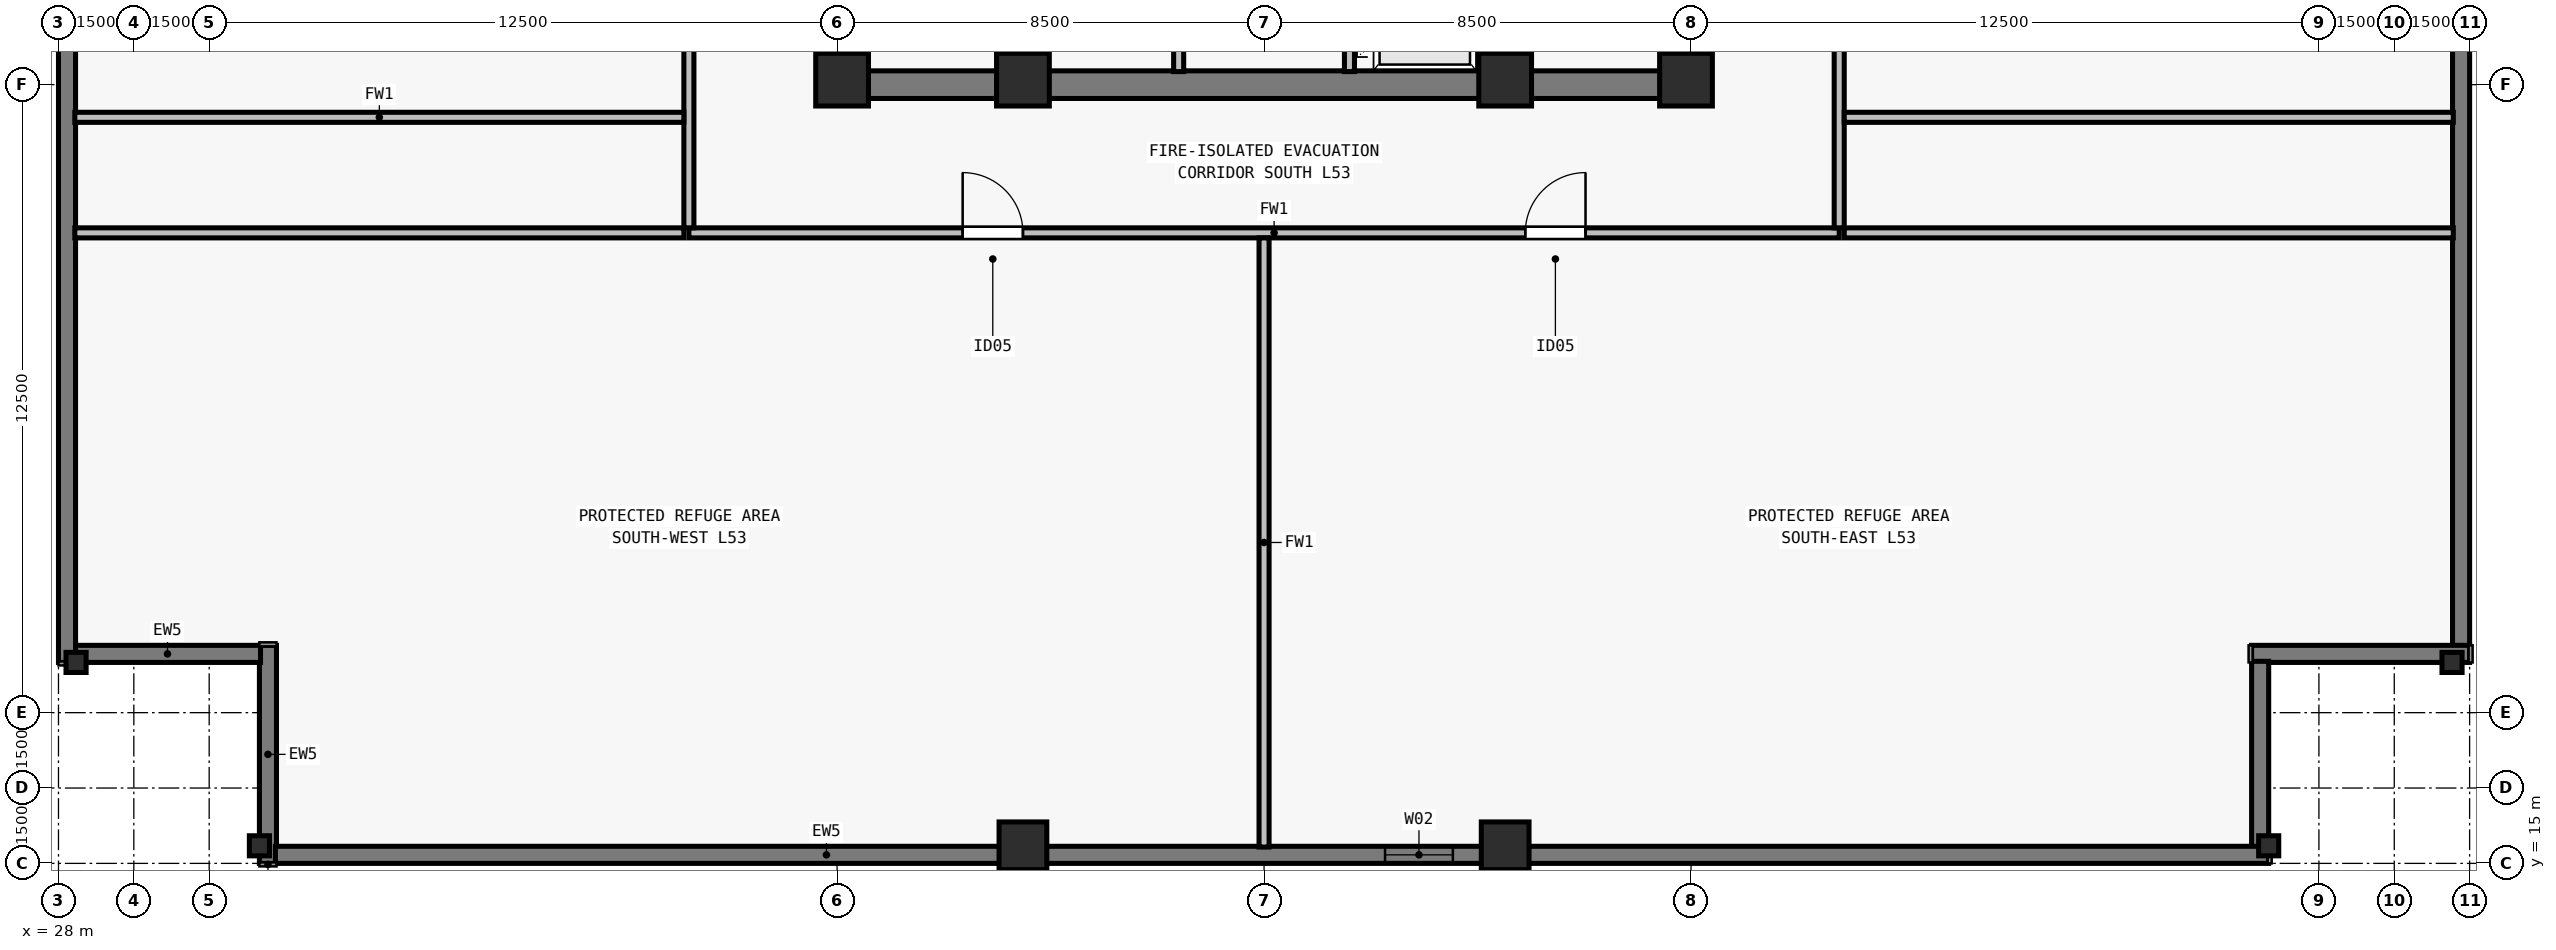
"""IFC4 building model, lengths in metres.
Left out: names, types, materials, properties, quantities, classifications, styles, units other than length and angle.
Written with IfcOpenShell. Run it as: python <this file> out.ifc"""

import sys

from ifc_helpers import new_model, si_unit, direction, frame, frame_2d, origin, origin_2d, place, context, subcontext, project, spatial, rectangle, i_section, extrude, element, fill, save


model = new_model("IFC4")
c1 = context("Model", 3, precision=1e-05, world=origin(), true_north=direction((0.0, 1.0)))
c2 = subcontext(c1, "Body", "Model", "MODEL_VIEW")
j1 = project(units=[si_unit("LENGTHUNIT", "METRE"), si_unit("PLANEANGLEUNIT", "RADIAN")], contexts=[c1])
p1 = place(None, origin())
s1 = spatial("IfcSite", under=j1, at=p1, CompositionType="ELEMENT")
p2 = place(p1, origin())
s2 = spatial("IfcBuilding", under=s1, at=p2, CompositionType="ELEMENT")
p3 = place(p2, frame((0.0, 0.0, 193.5)))
s3 = spatial("IfcBuildingStorey", under=s2, at=p3, CompositionType="ELEMENT", Elevation=193.5)
for number, where, z_axis, x_axis in (
    (1, (43.6, 30.6, 0.0), (0.0, 0.0, 1.0), (1.0, 0.0, 0.0)),
    (2, (47.2, 30.6, 0.0), (0.0, 0.0, 1.0), (1.0, 0.0, 0.0)),
    (3, (56.8, 30.6, 0.0), (0.0, 0.0, 1.0), (1.0, 0.0, 0.0)),
    (4, (60.4, 30.6, 0.0), (0.0, 0.0, 1.0), (1.0, 0.0, 0.0)),
):
    element("IfcColumn", number, at=place(p3, frame(where, z_axis=z_axis, x_axis=x_axis)), inside=s3, PredefinedType="COLUMN", context=c2, shape_type="SweptSolid", body=[
        extrude(rectangle(XDim=1.05, YDim=1.05, at=origin_2d()), origin(), (0.0, 0.0, 1.0), 4.5),
    ])
p4 = place(p3, frame((32.0, 15.35, 0.0), z_axis=(0.0, 0.0, 1.0), x_axis=(1.0, 0.0, 0.0)))
e5 = element("IfcColumn", 5, at=p4, inside=s3, PredefinedType="COLUMN", context=c2, shape_type="SweptSolid", body=[
    extrude(i_section(OverallWidth=0.4, OverallDepth=0.4, WebThickness=0.022, FlangeThickness=0.036, at=origin_2d()), origin(), (0.0, 0.0, 1.0), 4.5),
])
for number, where, z_axis, x_axis in (
    (6, (47.2, 15.35, 0.0), (0.0, 0.0, 1.0), (1.0, 0.0, 0.0)),
    (7, (56.8, 15.35, 0.0), (0.0, 0.0, 1.0), (1.0, 0.0, 0.0)),
):
    element("IfcColumn", number, at=place(p3, frame(where, z_axis=z_axis, x_axis=x_axis)), inside=s3, PredefinedType="COLUMN", context=c2, shape_type="SweptSolid", body=[
        extrude(rectangle(XDim=0.95, YDim=0.95, at=origin_2d()), origin(), (0.0, 0.0, 1.0), 4.5),
    ])
for number, where, z_axis, x_axis in (
    (8, (72.0, 15.35, 0.0), (0.0, 0.0, 1.0), (1.0, 0.0, 0.0)),
    (9, (75.65, 19.0, 0.0), (0.0, 0.0, 1.0), (0.0, 1.0, 0.0)),
    (10, (28.35, 19.0, 0.0), (0.0, 0.0, 1.0), (0.0, 1.0, 0.0)),
):
    element("IfcColumn", number, at=place(p3, frame(where, z_axis=z_axis, x_axis=x_axis)), inside=s3, PredefinedType="COLUMN", context=c2, shape_type="SweptSolid", body=[
        extrude(i_section(OverallWidth=0.4, OverallDepth=0.4, WebThickness=0.022, FlangeThickness=0.036, at=origin_2d()), origin(), (0.0, 0.0, 1.0), 4.5),
    ])
p5 = place(p3, frame((32.17, 15.0, 0.0), z_axis=(0.0, 0.0, 1.0), x_axis=(0.0, 1.0, 0.0)))
e11 = element("IfcWall", 11, at=p5, inside=s3, PredefinedType="SOLIDWALL", context=c2, shape_type="SweptSolid", body=[
    extrude(rectangle(XDim=4.34, YDim=0.34, at=frame_2d((2.17, 0.0))), origin(), (0.0, 0.0, 1.0), 4.29),
])
p6 = place(p3, frame((32.022, 19.17, 0.0), z_axis=(0.0, 0.0, 1.0), x_axis=(-1.0, 0.0, 0.0)))
e12 = element("IfcWall", 12, at=p6, inside=s3, PredefinedType="SOLIDWALL", context=c2, shape_type="SweptSolid", body=[
    extrude(rectangle(XDim=3.704, YDim=0.34, at=frame_2d((1.852, 0.0))), origin(), (0.0, 0.0, 1.0), 4.29),
])
for number, where, z_axis, x_axis in (
    (13, (28.17, 19.0, 0.0), (0.0, 0.0, 1.0), (0.0, 1.0, 0.0)),
    (14, (75.83, 59.0, 0.0), (0.0, 0.0, 1.0), (0.0, -1.0, 0.0)),
):
    element("IfcWall", number, at=place(p3, frame(where, z_axis=z_axis, x_axis=x_axis)), inside=s3, PredefinedType="SOLIDWALL", context=c2, shape_type="SweptSolid", body=[
        extrude(rectangle(XDim=39.682, YDim=0.34, at=frame_2d((19.841, 0.0))), origin(), (0.0, 0.0, 1.0), 4.29),
    ])
p7 = place(p3, frame((76.0, 19.17, 0.0), z_axis=(0.0, 0.0, 1.0), x_axis=(-1.0, 0.0, 0.0)))
e15 = element("IfcWall", 15, at=p7, inside=s3, PredefinedType="SOLIDWALL", context=c2, shape_type="SweptSolid", body=[
    extrude(rectangle(XDim=4.34, YDim=0.34, at=frame_2d((2.17, 0.0))), origin(), (0.0, 0.0, 1.0), 4.29),
])
p8 = place(p3, frame((71.83, 19.022, 0.0), z_axis=(0.0, 0.0, 1.0), x_axis=(0.0, -1.0, 0.0)))
e16 = element("IfcWall", 16, at=p8, inside=s3, PredefinedType="SOLIDWALL", context=c2, shape_type="SweptSolid", body=[
    extrude(rectangle(XDim=3.704, YDim=0.34, at=frame_2d((1.852, 0.0))), origin(), (0.0, 0.0, 1.0), 4.29),
])
p9 = place(p3, frame((72.0, 15.17, 0.0), z_axis=(0.0, 0.0, 1.0), x_axis=(-1.0, 0.0, 0.0)))
e17 = element("IfcWall", 17, at=p9, inside=s3, PredefinedType="SOLIDWALL", context=c2, shape_type="SweptSolid", body=[
    extrude(rectangle(XDim=39.682, YDim=0.34, at=frame_2d((19.841, 0.0))), origin(), (0.0, 0.0, 1.0), 4.29),
])
p10 = place(p9, frame((16.241, 0.0, 0.8)))
e18 = element("IfcOpeningElement", 18, at=p10, cuts=e17, PredefinedType="OPENING", context=c2, shape_type="SweptSolid", body=[
    extrude(rectangle(XDim=1.35, YDim=1.54, at=frame_2d((0.675, 0.77))), frame((0.0, 0.18, 0.0), z_axis=(0.0, -1.0, 0.0), x_axis=(1.0, 0.0, 0.0)), (0.0, 0.0, 1.0), 0.36),
])
p11 = place(p3, frame((43.225, 30.5, 0.0), z_axis=(0.0, 0.0, 1.0), x_axis=(1.0, 0.0, 0.0)))
e19 = element("IfcWall", 19, at=p11, inside=s3, PredefinedType="SHEAR", context=c2, shape_type="SweptSolid", body=[
    extrude(rectangle(XDim=17.55, YDim=0.55, at=frame_2d((8.775, 0.0))), origin(), (0.0, 0.0, 1.0), 4.29),
])
for number, where, z_axis, x_axis in (
    (20, (43.5, 30.765, 0.0), (0.0, 0.0, 1.0), (0.0, 1.0, 0.0)),
    (21, (60.5, 30.765, 0.0), (0.0, 0.0, 1.0), (0.0, 1.0, 0.0)),
):
    element("IfcWall", number, at=place(p3, frame(where, z_axis=z_axis, x_axis=x_axis)), inside=s3, PredefinedType="SHEAR", context=c2, shape_type="SweptSolid", body=[
        extrude(rectangle(XDim=7.985, YDim=0.55, at=frame_2d((3.993, 0.0))), origin(), (0.0, 0.0, 1.0), 4.29),
    ])
p12 = place(p3, frame((50.3, 30.76, 0.0), z_axis=(0.0, 0.0, 1.0), x_axis=(0.0, 1.0, 0.0)))
e22 = element("IfcWall", 22, at=p12, inside=s3, PredefinedType="SOLIDWALL", context=c2, shape_type="SweptSolid", body=[
    extrude(rectangle(XDim=7.855, YDim=0.2, at=frame_2d((3.927, 0.0))), origin(), (0.0, 0.0, 1.0), 4.29),
])
p13 = place(p12, frame((1.34, 0.0, 0.0)))
e23 = element("IfcOpeningElement", 23, at=p13, cuts=e22, PredefinedType="OPENING", context=c2, shape_type="SweptSolid", body=[
    extrude(rectangle(XDim=0.9, YDim=2.12, at=frame_2d((0.45, 1.06))), frame((0.0, 0.11, 0.0), z_axis=(0.0, -1.0, 0.0), x_axis=(1.0, 0.0, 0.0)), (0.0, 0.0, 1.0), 0.22),
])
p14 = place(p12, frame((5.34, 0.0, 0.0)))
e24 = element("IfcOpeningElement", 24, at=p14, cuts=e22, PredefinedType="OPENING", context=c2, shape_type="SweptSolid", body=[
    extrude(rectangle(XDim=0.9, YDim=2.12, at=frame_2d((0.45, 1.06))), frame((0.0, 0.11, 0.0), z_axis=(0.0, -1.0, 0.0), x_axis=(1.0, 0.0, 0.0)), (0.0, 0.0, 1.0), 0.22),
])
p15 = place(p3, frame((53.7, 30.76, 0.0), z_axis=(0.0, 0.0, 1.0), x_axis=(0.0, 1.0, 0.0)))
e25 = element("IfcWall", 25, at=p15, inside=s3, PredefinedType="SOLIDWALL", context=c2, shape_type="SweptSolid", body=[
    extrude(rectangle(XDim=7.855, YDim=0.2, at=frame_2d((3.927, 0.0))), origin(), (0.0, 0.0, 1.0), 4.29),
])
p16 = place(p15, frame((0.79, 0.0, 0.0)))
e26 = element("IfcOpeningElement", 26, at=p16, cuts=e25, PredefinedType="OPENING", context=c2, shape_type="SweptSolid", body=[
    extrude(rectangle(XDim=1.1, YDim=2.2, at=frame_2d((0.55, 1.1))), frame((0.0, 0.11, 0.0), z_axis=(0.0, -1.0, 0.0), x_axis=(1.0, 0.0, 0.0)), (0.0, 0.0, 1.0), 0.22),
])
p17 = place(p15, frame((3.49, 0.0, 0.0)))
e27 = element("IfcOpeningElement", 27, at=p17, cuts=e25, PredefinedType="OPENING", context=c2, shape_type="SweptSolid", body=[
    extrude(rectangle(XDim=1.1, YDim=2.2, at=frame_2d((0.55, 1.1))), frame((0.0, 0.11, 0.0), z_axis=(0.0, -1.0, 0.0), x_axis=(1.0, 0.0, 0.0)), (0.0, 0.0, 1.0), 0.22),
])
p18 = place(p15, frame((6.19, 0.0, 0.0)))
e28 = element("IfcOpeningElement", 28, at=p18, cuts=e25, PredefinedType="OPENING", context=c2, shape_type="SweptSolid", body=[
    extrude(rectangle(XDim=1.1, YDim=2.2, at=frame_2d((0.55, 1.1))), frame((0.0, 0.11, 0.0), z_axis=(0.0, -1.0, 0.0), x_axis=(1.0, 0.0, 0.0)), (0.0, 0.0, 1.0), 0.22),
])
p19 = place(p3, frame((47.35, 30.76, 0.0), z_axis=(0.0, 0.0, 1.0), x_axis=(0.0, 1.0, 0.0)))
e29 = element("IfcWall", 29, at=p19, inside=s3, PredefinedType="PARTITIONING", context=c2, shape_type="SweptSolid", body=[
    extrude(rectangle(XDim=7.855, YDim=0.16, at=frame_2d((3.927, 0.0))), origin(), (0.0, 0.0, 1.0), 4.29),
])
p20 = place(p3, frame((56.65, 30.76, 0.0), z_axis=(0.0, 0.0, 1.0), x_axis=(0.0, 1.0, 0.0)))
e30 = element("IfcWall", 30, at=p20, inside=s3, PredefinedType="SOLIDWALL", context=c2, shape_type="SweptSolid", body=[
    extrude(rectangle(XDim=7.855, YDim=0.18, at=frame_2d((3.927, 0.0))), origin(), (0.0, 0.0, 1.0), 4.29),
])
p21 = place(p3, frame((40.55, 27.55, 0.0), z_axis=(0.0, 0.0, 1.0), x_axis=(1.0, 0.0, 0.0)))
e31 = element("IfcWall", 31, at=p21, inside=s3, PredefinedType="SOLIDWALL", context=c2, shape_type="SweptSolid", body=[
    extrude(rectangle(XDim=22.9, YDim=0.2, at=frame_2d((11.45, 0.0))), origin(), (0.0, 0.0, 1.0), 4.29),
])
p22 = place(p21, frame((5.45, 0.0, 0.0)))
e32 = element("IfcOpeningElement", 32, at=p22, cuts=e31, PredefinedType="OPENING", context=c2, shape_type="SweptSolid", body=[
    extrude(rectangle(XDim=1.2, YDim=2.15, at=frame_2d((0.6, 1.075))), frame((0.0, 0.11, 0.0), z_axis=(0.0, -1.0, 0.0), x_axis=(1.0, 0.0, 0.0)), (0.0, 0.0, 1.0), 0.22),
])
p23 = place(p21, frame((16.65, 0.0, 0.0)))
e33 = element("IfcOpeningElement", 33, at=p23, cuts=e31, PredefinedType="OPENING", context=c2, shape_type="SweptSolid", body=[
    extrude(rectangle(XDim=1.2, YDim=2.15, at=frame_2d((0.6, 1.075))), frame((0.0, 0.11, 0.0), z_axis=(0.0, -1.0, 0.0), x_axis=(1.0, 0.0, 0.0)), (0.0, 0.0, 1.0), 0.22),
])
p24 = place(p3, frame((40.55, 27.65, 0.0), z_axis=(0.0, 0.0, 1.0), x_axis=(0.0, 1.0, 0.0)))
e34 = element("IfcWall", 34, at=p24, inside=s3, PredefinedType="SOLIDWALL", context=c2, shape_type="SweptSolid", body=[
    extrude(rectangle(XDim=22.7, YDim=0.2, at=frame_2d((11.35, 0.0))), origin(), (0.0, 0.0, 1.0), 4.29),
])
p25 = place(p24, frame((9.2, 0.0, 0.0)))
e35 = element("IfcOpeningElement", 35, at=p25, cuts=e34, PredefinedType="OPENING", context=c2, shape_type="SweptSolid", body=[
    extrude(rectangle(XDim=1.6, YDim=2.2, at=frame_2d((0.8, 1.1))), frame((0.0, 0.11, 0.0), z_axis=(0.0, -1.0, 0.0), x_axis=(1.0, 0.0, 0.0)), (0.0, 0.0, 1.0), 0.22),
])
p26 = place(p3, frame((63.45, 27.65, 0.0), z_axis=(0.0, 0.0, 1.0), x_axis=(0.0, 1.0, 0.0)))
e36 = element("IfcWall", 36, at=p26, inside=s3, PredefinedType="SOLIDWALL", context=c2, shape_type="SweptSolid", body=[
    extrude(rectangle(XDim=22.7, YDim=0.2, at=frame_2d((11.35, 0.0))), origin(), (0.0, 0.0, 1.0), 4.29),
])
p27 = place(p26, frame((9.2, 0.0, 0.0)))
e37 = element("IfcOpeningElement", 37, at=p27, cuts=e36, PredefinedType="OPENING", context=c2, shape_type="SweptSolid", body=[
    extrude(rectangle(XDim=1.6, YDim=2.2, at=frame_2d((0.8, 1.1))), frame((0.0, 0.11, 0.0), z_axis=(0.0, -1.0, 0.0), x_axis=(1.0, 0.0, 0.0)), (0.0, 0.0, 1.0), 0.22),
])
for number, where, z_axis, x_axis in (
    (38, (28.325, 29.85, 0.0), (0.0, 0.0, 1.0), (1.0, 0.0, 0.0)),
    (39, (63.55, 29.85, 0.0), (0.0, 0.0, 1.0), (1.0, 0.0, 0.0)),
):
    element("IfcWall", number, at=place(p3, frame(where, z_axis=z_axis, x_axis=x_axis)), inside=s3, PredefinedType="SOLIDWALL", context=c2, shape_type="SweptSolid", body=[
        extrude(rectangle(XDim=12.125, YDim=0.2, at=frame_2d((6.062, 0.0))), origin(), (0.0, 0.0, 1.0), 4.29),
    ])
for number, where, z_axis, x_axis in (
    (40, (52.0, 15.325, 0.0), (0.0, 0.0, 1.0), (0.0, 1.0, 0.0)),
    (41, (28.325, 27.55, 0.0), (0.0, 0.0, 1.0), (1.0, 0.0, 0.0)),
    (42, (63.55, 27.55, 0.0), (0.0, 0.0, 1.0), (1.0, 0.0, 0.0)),
):
    element("IfcWall", number, at=place(p3, frame(where, z_axis=z_axis, x_axis=x_axis)), inside=s3, PredefinedType="SOLIDWALL", context=c2, shape_type="SweptSolid", body=[
        extrude(rectangle(XDim=12.125, YDim=0.2, at=frame_2d((6.062, 0.0))), origin(), (0.0, 0.0, 1.0), 3.906),
    ])
for number, where, z_axis, x_axis in (
    (43, (47.07, 38.78, 0.0), (0.0, 0.0, 1.0), (0.0, -1.0, 0.0)),
    (44, (56.93, 38.78, 0.0), (0.0, 0.0, 1.0), (0.0, -1.0, 0.0)),
):
    element("IfcWall", number, at=place(p3, frame(where, z_axis=z_axis, x_axis=x_axis)), inside=s3, PredefinedType="SOLIDWALL", context=c2, shape_type="SweptSolid", body=[
        extrude(rectangle(XDim=8.017, YDim=0.18, at=frame_2d((4.009, 0.0))), origin(), (0.0, 0.0, 1.0), 4.29),
    ])
p28 = place(p10, origin())
e45 = element("IfcWindow", 45, at=p28, inside=s3, PartitioningType="SINGLE_PANEL", PredefinedType="WINDOW", context=c2, shape_type="SweptSolid", body=[
    extrude(rectangle(XDim=1.35, YDim=1.54, at=frame_2d((0.675, 0.77))), frame((0.0, -0.04, 0.0), z_axis=(0.0, -1.0, 0.0), x_axis=(1.0, 0.0, 0.0)), (0.0, 0.0, 1.0), 0.06),
])
fill(e18, e45)
p29 = place(p22, origin())
e46 = element("IfcDoor", 46, at=p29, inside=s3, OperationType="SINGLE_SWING_LEFT", PredefinedType="DOOR", context=c2, shape_type="SweptSolid", body=[
    extrude(rectangle(XDim=1.2, YDim=2.15, at=frame_2d((0.6, 1.075))), frame((0.0, 0.025, 0.0), z_axis=(0.0, -1.0, 0.0), x_axis=(1.0, 0.0, 0.0)), (0.0, 0.0, 1.0), 0.05),
])
fill(e32, e46)
p30 = place(p23, origin())
e47 = element("IfcDoor", 47, at=p30, inside=s3, OperationType="SINGLE_SWING_RIGHT", PredefinedType="DOOR", context=c2, shape_type="SweptSolid", body=[
    extrude(rectangle(XDim=1.2, YDim=2.15, at=frame_2d((0.6, 1.075))), frame((0.0, 0.025, 0.0), z_axis=(0.0, -1.0, 0.0), x_axis=(1.0, 0.0, 0.0)), (0.0, 0.0, 1.0), 0.05),
])
fill(e33, e47)
save(model, sys.argv[1])
